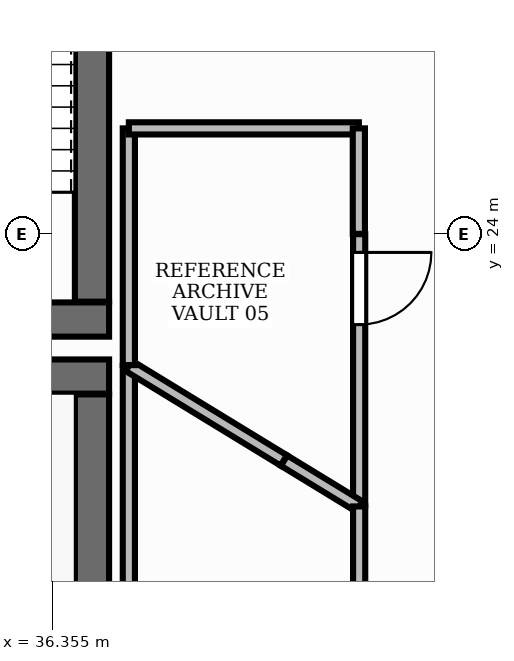
"""IFC4 building model, lengths in metres.
Left out: names, types, materials, properties, quantities, classifications, styles, units other than length and angle.
Written with IfcOpenShell. Run it as: python <this file> out.ifc"""

import sys

from ifc_helpers import new_model, si_unit, direction, frame, frame_2d, origin, place, context, subcontext, project, spatial, rectangle, extrude, element, fill, save


model = new_model("IFC4")
c1 = context("Model", 3, precision=1e-05, world=origin(), true_north=direction((0.0, 1.0)))
c2 = subcontext(c1, "Body", "Model", "MODEL_VIEW")
j1 = project(units=[si_unit("LENGTHUNIT", "METRE"), si_unit("PLANEANGLEUNIT", "RADIAN")], contexts=[c1])
p1 = place(None, origin())
s1 = spatial("IfcSite", under=j1, at=p1, CompositionType="ELEMENT")
p2 = place(p1, origin())
s2 = spatial("IfcBuilding", under=s1, at=p2, CompositionType="ELEMENT")
p3 = place(p2, frame((0.0, 0.0, 90.0)))
s3 = spatial("IfcBuildingStorey", under=s2, at=p3, CompositionType="ELEMENT", Elevation=90.0)
p4 = place(p3, frame((28.35, 22.125, 0.0), z_axis=(0.0, 0.0, 1.0), x_axis=(1.0, 0.0, 0.0)))
e1 = element("IfcWall", 1, at=p4, inside=s3, PredefinedType="SHEAR", context=c2, shape_type="SweptSolid", body=[
    extrude(rectangle(XDim=8.75, YDim=0.45, at=frame_2d((4.375, 0.0))), origin(), (0.0, 0.0, 1.0), 3.9),
])
p5 = place(p3, frame((36.875, 18.81, 0.0), z_axis=(0.0, 0.0, 1.0), x_axis=(0.0, 1.0, 0.0)))
e2 = element("IfcWall", 2, at=p5, inside=s3, PredefinedType="SHEAR", context=c2, shape_type="SweptSolid", body=[
    extrude(rectangle(XDim=3.08, YDim=0.45, at=frame_2d((1.54, 0.0))), origin(), (0.0, 0.0, 1.0), 3.9),
])
p6 = place(p3, frame((33.1, 22.875, 0.0), z_axis=(0.0, 0.0, 1.0), x_axis=(1.0, 0.0, 0.0)))
e3 = element("IfcWall", 3, at=p6, inside=s3, PredefinedType="SHEAR", context=c2, shape_type="SweptSolid", body=[
    extrude(rectangle(XDim=4.0, YDim=0.45, at=frame_2d((2.0, 0.0))), origin(), (0.0, 0.0, 1.0), 3.9),
])
p7 = place(p3, frame((36.875, 23.11, 0.0), z_axis=(0.0, 0.0, 1.0), x_axis=(0.0, 1.0, 0.0)))
e4 = element("IfcWall", 4, at=p7, inside=s3, PredefinedType="SHEAR", context=c2, shape_type="SweptSolid", body=[
    extrude(rectangle(XDim=7.78, YDim=0.45, at=frame_2d((3.89, 0.0))), origin(), (0.0, 0.0, 1.0), 3.9),
])
p8 = place(p3, frame((40.39, 23.998, 0.0), z_axis=(0.0, 0.0, 1.0), x_axis=(0.0, -1.0, 0.0)))
e5 = element("IfcWall", 5, at=p8, inside=s3, PredefinedType="PARTITIONING", context=c2, shape_type="SweptSolid", body=[
    extrude(rectangle(XDim=3.57, YDim=0.16, at=frame_2d((1.785, 0.0))), origin(), (0.0, 0.0, 1.0), 2.91),
])
p9 = place(p8, frame((0.24, 0.0, 0.0)))
e6 = element("IfcOpeningElement", 6, at=p9, cuts=e5, PredefinedType="OPENING", context=c2, shape_type="SweptSolid", body=[
    extrude(rectangle(XDim=0.95, YDim=2.15, at=frame_2d((0.475, 1.075))), frame((0.0, 0.095, 0.0), z_axis=(0.0, -1.0, 0.0), x_axis=(1.0, 0.0, 0.0)), (0.0, 0.0, 1.0), 0.19),
])
p10 = place(p3, frame((39.402, 21.019, 0.0), z_axis=(0.0, 0.0, 1.0), x_axis=(0.853521615148, -0.52105743683, 0.0)))
e7 = element("IfcWall", 7, at=p10, inside=s3, PredefinedType="PARTITIONING", context=c2, shape_type="SweptSolid", body=[
    extrude(rectangle(XDim=1.157, YDim=0.16, at=frame_2d((0.579, 0.0))), origin(), (0.0, 0.0, 1.0), 2.91),
])
p11 = place(p3, frame((40.39, 20.416, 0.0), z_axis=(0.0, 0.0, 1.0), x_axis=(0.0, -1.0, 0.0)))
e8 = element("IfcWall", 8, at=p11, inside=s3, PredefinedType="PARTITIONING", context=c2, shape_type="SweptSolid", body=[
    extrude(rectangle(XDim=3.916, YDim=0.16, at=frame_2d((1.958, 0.0))), origin(), (0.0, 0.0, 1.0), 2.91),
])
p12 = place(p3, frame((37.36, 18.1, 0.0), z_axis=(0.0, 0.0, 1.0), x_axis=(0.0, 1.0, 0.0)))
e9 = element("IfcWall", 9, at=p12, inside=s3, PredefinedType="PARTITIONING", context=c2, shape_type="SweptSolid", body=[
    extrude(rectangle(XDim=4.166, YDim=0.16, at=frame_2d((2.083, 0.0))), origin(), (0.0, 0.0, 1.0), 2.91),
])
p13 = place(p3, frame((37.36, 22.266, 0.0), z_axis=(0.0, 0.0, 1.0), x_axis=(0.85352442543, -0.521052833401, 0.0)))
e10 = element("IfcWall", 10, at=p13, inside=s3, PredefinedType="PARTITIONING", context=c2, shape_type="SweptSolid", body=[
    extrude(rectangle(XDim=2.387, YDim=0.16, at=frame_2d((1.194, 0.0))), origin(), (0.0, 0.0, 1.0), 2.91),
])
p14 = place(p3, frame((37.36, 22.276, 0.0), z_axis=(0.0, 0.0, 1.0), x_axis=(0.0, 1.0, 0.0)))
e11 = element("IfcWall", 11, at=p14, inside=s3, PredefinedType="PARTITIONING", context=c2, shape_type="SweptSolid", body=[
    extrude(rectangle(XDim=3.114, YDim=0.16, at=frame_2d((1.557, 0.0))), origin(), (0.0, 0.0, 1.0), 2.91),
])
p15 = place(p3, frame((37.36, 25.39, 0.0), z_axis=(0.0, 0.0, 1.0), x_axis=(1.0, 0.0, 0.0)))
e12 = element("IfcWall", 12, at=p15, inside=s3, PredefinedType="PARTITIONING", context=c2, shape_type="SweptSolid", body=[
    extrude(rectangle(XDim=3.026, YDim=0.16, at=frame_2d((1.513, 0.0))), origin(), (0.0, 0.0, 1.0), 2.91),
])
p16 = place(p3, frame((40.386, 25.39, 0.0), z_axis=(0.0, 0.0, 1.0), x_axis=(0.0, -1.0, 0.0)))
e13 = element("IfcWall", 13, at=p16, inside=s3, PredefinedType="PARTITIONING", context=c2, shape_type="SweptSolid", body=[
    extrude(rectangle(XDim=1.388, YDim=0.16, at=frame_2d((0.694, 0.0))), origin(), (0.0, 0.0, 1.0), 2.91),
])
p17 = place(p9, origin())
e14 = element("IfcDoor", 14, at=p17, inside=s3, OperationType="SINGLE_SWING_LEFT", PredefinedType="DOOR", context=c2, shape_type="SweptSolid", body=[
    extrude(rectangle(XDim=0.95, YDim=2.15, at=frame_2d((0.475, 1.075))), frame((0.0, 0.025, 0.0), z_axis=(0.0, -1.0, 0.0), x_axis=(1.0, 0.0, 0.0)), (0.0, 0.0, 1.0), 0.05),
])
fill(e6, e14)
save(model, sys.argv[1])
